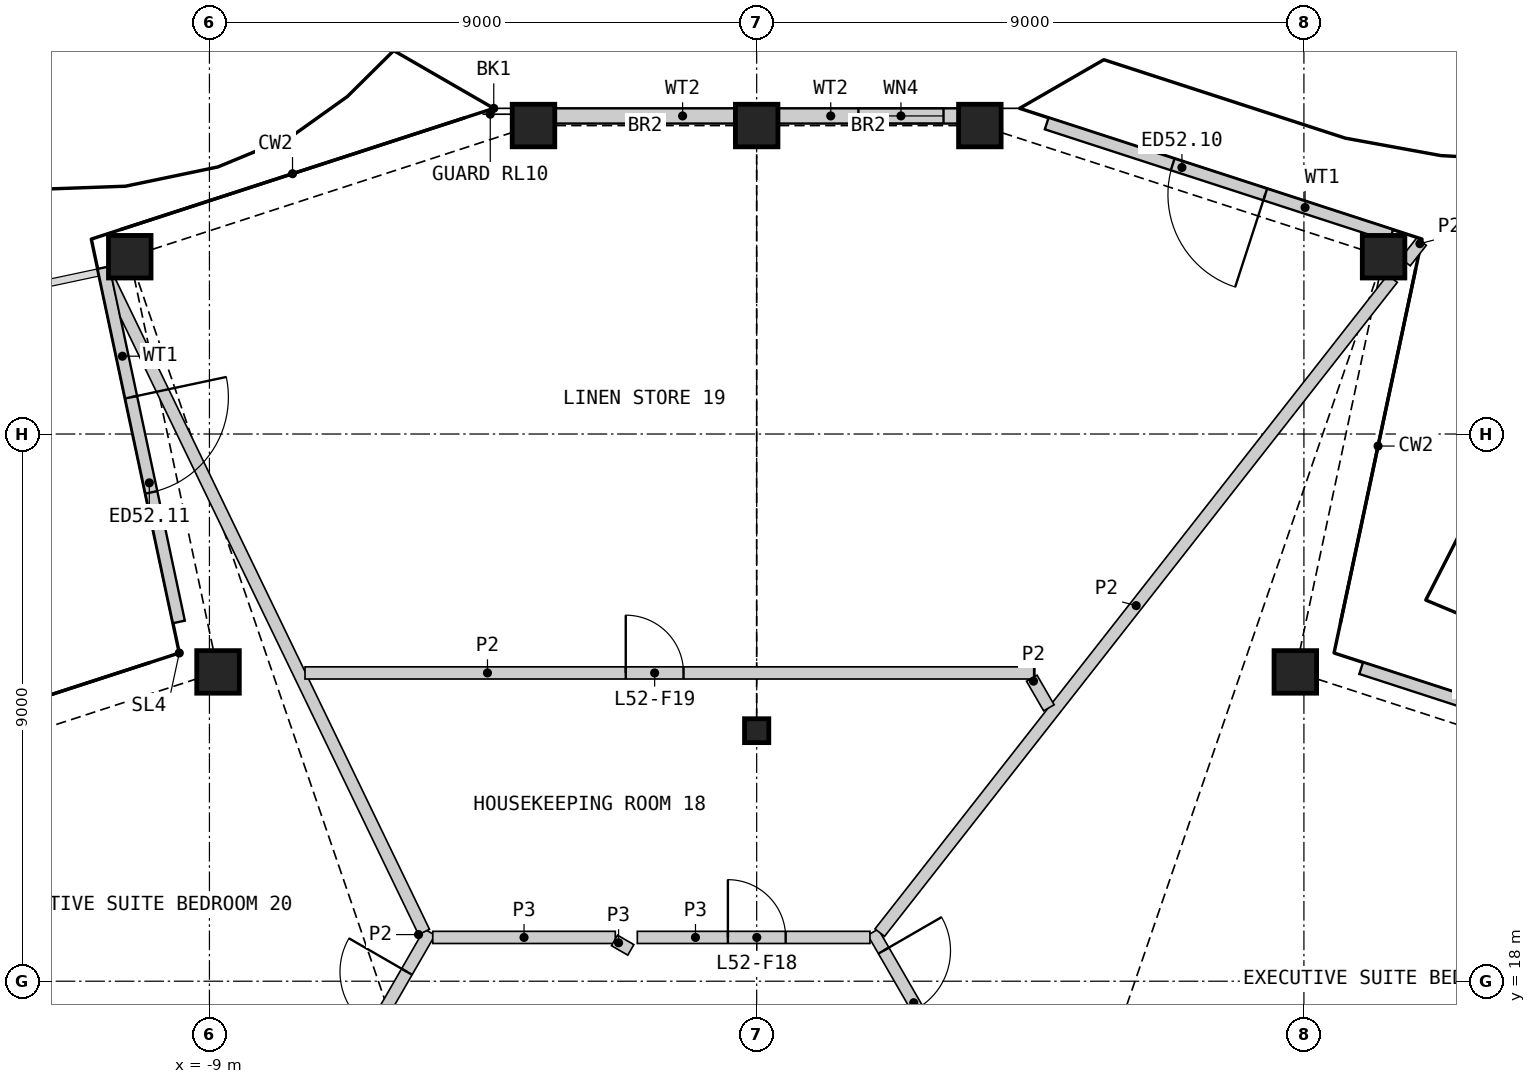
"""IFC4 building model, lengths in metres.
Left out: names, types, materials, properties, quantities, classifications, styles, units other than length and angle.
Written with IfcOpenShell. Run it as: python <this file> out.ifc"""

import sys

from ifc_helpers import new_model, si_unit, direction, frame, frame_2d, origin, origin_2d, place, context, subcontext, project, spatial, polyline, rectangle, hollow_rectangle, i_section, outline, extrude, element, fill, save


model = new_model("IFC4")
c1 = context("Model", 3, precision=1e-05, world=origin(), true_north=direction((0.0, 1.0)))
c2 = subcontext(c1, "Body", "Model", "MODEL_VIEW")
j1 = project(units=[si_unit("LENGTHUNIT", "METRE"), si_unit("PLANEANGLEUNIT", "RADIAN")], contexts=[c1])
p1 = place(None, origin())
s1 = spatial("IfcSite", under=j1, at=p1, CompositionType="ELEMENT")
p2 = place(p1, origin())
s2 = spatial("IfcBuilding", under=s1, at=p2, CompositionType="ELEMENT")
p3 = place(p2, frame((0.0, 0.0, 238.2)))
s3 = spatial("IfcBuildingStorey", under=s2, at=p3, CompositionType="ELEMENT", Elevation=238.2)
for number, where, z_axis, x_axis in (
    (1, (8.859, 23.087, 0.0), (0.0, 0.0, 1.0), (1.0, 0.0, 0.0)),
    (2, (10.31, 29.916, 0.0), (0.0, 0.0, 1.0), (1.0, 0.0, 0.0)),
    (3, (3.67, 32.073, 0.0), (0.0, 0.0, 1.0), (1.0, 0.0, 0.0)),
    (4, (0.0, 32.073, 0.0), (0.0, 0.0, 1.0), (1.0, 0.0, 0.0)),
    (5, (-3.67, 32.073, 0.0), (0.0, 0.0, 1.0), (1.0, 0.0, 0.0)),
    (6, (-10.31, 29.916, 0.0), (0.0, 0.0, 1.0), (1.0, 0.0, 0.0)),
    (7, (-8.859, 23.087, 0.0), (0.0, 0.0, 1.0), (1.0, 0.0, 0.0)),
):
    element("IfcColumn", number, at=place(p3, frame(where, z_axis=z_axis, x_axis=x_axis)), inside=s3, PredefinedType="COLUMN", context=c2, shape_type="SweptSolid", body=[
        extrude(hollow_rectangle(XDim=0.7, YDim=0.7, WallThickness=0.045, at=origin_2d()), origin(), (0.0, 0.0, 1.0), 3.6),
    ])
p4 = place(p3, frame((0.0, 22.121, 0.0), z_axis=(0.0, 0.0, 1.0), x_axis=(1.0, 0.0, 0.0)))
e8 = element("IfcColumn", 8, at=p4, inside=s3, PredefinedType="COLUMN", context=c2, shape_type="SweptSolid", body=[
    extrude(i_section(OverallWidth=0.399, OverallDepth=0.393, WebThickness=0.023, FlangeThickness=0.037, at=origin_2d()), origin(), (0.0, 0.0, 1.0), 3.6),
])
p5 = place(p3, frame((15.607, 21.308, 0.0), z_axis=(0.0, 0.0, 1.0), x_axis=(-0.951065383831, 0.308989701572, 0.0)))
e9 = element("IfcWall", 9, at=p5, inside=s3, PredefinedType="SOLIDWALL", context=c2, shape_type="SweptSolid", body=[
    extrude(rectangle(XDim=5.958, YDim=0.2, at=frame_2d((2.979, 0.0))), origin(), (0.0, 0.0, 1.0), 2.701),
])
p6 = place(p5, frame((2.179, 0.0, 0.0)))
e10 = element("IfcOpeningElement", 10, at=p6, cuts=e9, PredefinedType="OPENING", context=c2, shape_type="SweptSolid", body=[
    extrude(rectangle(XDim=1.6, YDim=2.4, at=frame_2d((0.8, 1.2))), frame((0.0, 0.11, 0.0), z_axis=(0.0, -1.0, 0.0), x_axis=(1.0, 0.0, 0.0)), (0.0, 0.0, 1.0), 0.22),
])
p7 = place(p3, frame((10.435, 30.266, 0.0), z_axis=(0.0, 0.0, 1.0), x_axis=(-0.951061471046, 0.309001744805, 0.0)))
e11 = element("IfcWall", 11, at=p7, inside=s3, PredefinedType="SOLIDWALL", context=c2, shape_type="SweptSolid", body=[
    extrude(rectangle(XDim=5.957, YDim=0.2, at=frame_2d((2.979, 0.0))), origin(), (0.0, 0.0, 1.0), 2.701),
])
p8 = place(p7, frame((2.179, 0.0, 0.0)))
e12 = element("IfcOpeningElement", 12, at=p8, cuts=e11, PredefinedType="OPENING", context=c2, shape_type="SweptSolid", body=[
    extrude(rectangle(XDim=1.6, YDim=2.4, at=frame_2d((0.8, 1.2))), frame((0.0, 0.11, 0.0), z_axis=(0.0, -1.0, 0.0), x_axis=(1.0, 0.0, 0.0)), (0.0, 0.0, 1.0), 0.22),
])
p9 = place(p3, frame((3.823, 32.231, 0.0), z_axis=(0.0, 0.0, 1.0), x_axis=(-1.0, 0.0, 0.0)))
e13 = element("IfcWall", 13, at=p9, inside=s3, PredefinedType="SOLIDWALL", context=c2, shape_type="SweptSolid", body=[
    extrude(rectangle(XDim=3.473, YDim=0.25, at=frame_2d((1.736, 0.0))), origin(), (0.0, 0.0, 1.0), 2.701),
])
p10 = place(p9, frame((0.75, 0.0, 1.8)))
e14 = element("IfcOpeningElement", 14, at=p10, cuts=e13, PredefinedType="OPENING", context=c2, shape_type="SweptSolid", body=[
    extrude(rectangle(XDim=1.4, YDim=0.7, at=frame_2d((0.7, 0.35))), frame((0.0, 0.135, 0.0), z_axis=(0.0, -1.0, 0.0), x_axis=(1.0, 0.0, 0.0)), (0.0, 0.0, 1.0), 0.27),
])
p11 = place(p3, frame((-0.35, 32.231, 0.0), z_axis=(0.0, 0.0, 1.0), x_axis=(-1.0, 0.0, 0.0)))
e15 = element("IfcWall", 15, at=p11, inside=s3, PredefinedType="SOLIDWALL", context=c2, shape_type="SweptSolid", body=[
    extrude(rectangle(XDim=3.473, YDim=0.25, at=frame_2d((1.736, 0.0))), origin(), (0.0, 0.0, 1.0), 2.701),
])
p12 = place(p3, frame((-10.741, 29.737, 0.0), z_axis=(0.0, 0.0, 1.0), x_axis=(0.207891593624, -0.978151872308, 0.0)))
e16 = element("IfcWall", 16, at=p12, inside=s3, PredefinedType="SOLIDWALL", context=c2, shape_type="SweptSolid", body=[
    extrude(rectangle(XDim=5.958, YDim=0.2, at=frame_2d((2.979, 0.0))), origin(), (0.0, 0.0, 1.0), 2.701),
])
p13 = place(p12, frame((2.179, 0.0, 0.0)))
e17 = element("IfcOpeningElement", 17, at=p13, cuts=e16, PredefinedType="OPENING", context=c2, shape_type="SweptSolid", body=[
    extrude(rectangle(XDim=1.6, YDim=2.4, at=frame_2d((0.8, 1.2))), frame((0.0, 0.11, 0.0), z_axis=(0.0, -1.0, 0.0), x_axis=(1.0, 0.0, 0.0)), (0.0, 0.0, 1.0), 0.22),
])
p14 = place(p3, frame((-18.976, -4.747, 0.0), z_axis=(0.0, 0.0, 1.0), x_axis=(0.499999852422, 0.866025488988, 0.0)))
e18 = element("IfcWall", 18, at=p14, inside=s3, PredefinedType="PARTITIONING", context=c2, shape_type="SweptSolid", body=[
    extrude(rectangle(XDim=27.198, YDim=0.2, at=frame_2d((13.599, 0.0))), origin(), (0.0, 0.0, 1.0), 3.25),
])
p15 = place(p14, frame((25.346, 0.0, 0.0)))
e19 = element("IfcOpeningElement", 19, at=p15, cuts=e18, PredefinedType="OPENING", context=c2, shape_type="SweptSolid", body=[
    extrude(rectangle(XDim=1.1, YDim=2.1, at=frame_2d((0.55, 1.05))), frame((0.0, 0.11, 0.0), z_axis=(0.0, -1.0, 0.0), x_axis=(1.0, 0.0, 0.0)), (0.0, 0.0, 1.0), 0.22),
])
p16 = place(p14, frame((16.713, 0.0, 0.0)))
e20 = element("IfcOpeningElement", 20, at=p16, cuts=e18, PredefinedType="OPENING", context=c2, shape_type="SweptSolid", body=[
    extrude(rectangle(XDim=1.1, YDim=2.1, at=frame_2d((0.55, 1.05))), frame((0.0, 0.11, 0.0), z_axis=(0.0, -1.0, 0.0), x_axis=(1.0, 0.0, 0.0)), (0.0, 0.0, 1.0), 0.22),
])
p17 = place(p14, frame((0.35, 0.0, 0.0)))
e21 = element("IfcOpeningElement", 21, at=p17, cuts=e18, PredefinedType="OPENING", context=c2, shape_type="SweptSolid", body=[
    extrude(rectangle(XDim=1.1, YDim=2.1, at=frame_2d((0.55, 1.05))), frame((0.0, 0.11, 0.0), z_axis=(0.0, -1.0, 0.0), x_axis=(1.0, 0.0, 0.0)), (0.0, 0.0, 1.0), 0.22),
])
p18 = place(p3, frame((1.913, 18.807, 0.0), z_axis=(0.0, 0.0, 1.0), x_axis=(0.499984524817, -0.866034338201, 0.0)))
e22 = element("IfcWall", 22, at=p18, inside=s3, PredefinedType="PARTITIONING", context=c2, shape_type="SweptSolid", body=[
    extrude(rectangle(XDim=5.51, YDim=0.2, at=frame_2d((2.755, 0.0))), origin(), (0.0, 0.0, 1.0), 3.25),
])
p19 = place(p18, frame((0.35, 0.0, 0.0)))
e23 = element("IfcOpeningElement", 23, at=p19, cuts=e22, PredefinedType="OPENING", context=c2, shape_type="SweptSolid", body=[
    extrude(rectangle(XDim=1.1, YDim=2.1, at=frame_2d((0.55, 1.05))), frame((0.0, 0.11, 0.0), z_axis=(0.0, -1.0, 0.0), x_axis=(1.0, 0.0, 0.0)), (0.0, 0.0, 1.0), 0.22),
])
p20 = place(p3, frame((-1.963, 18.72, 0.0), z_axis=(0.0, 0.0, 1.0), x_axis=(1.0, 0.0, 0.0)))
e24 = element("IfcWall", 24, at=p20, inside=s3, PredefinedType="PARTITIONING", context=c2, shape_type="SweptSolid", body=[
    extrude(rectangle(XDim=3.826, YDim=0.2, at=frame_2d((1.913, 0.0))), origin(), (0.0, 0.0, 1.0), 3.25),
])
p21 = place(p20, frame((1.49, 0.0, 0.0)))
e25 = element("IfcOpeningElement", 25, at=p21, cuts=e24, PredefinedType="OPENING", context=c2, shape_type="SweptSolid", body=[
    extrude(rectangle(XDim=0.95, YDim=2.1, at=frame_2d((0.475, 1.05))), frame((0.0, 0.11, 0.0), z_axis=(0.0, -1.0, 0.0), x_axis=(1.0, 0.0, 0.0)), (0.0, 0.0, 1.0), 0.22),
])
p22 = place(p3, frame((-5.327, 18.72, 0.0), z_axis=(0.0, 0.0, 1.0), x_axis=(1.0, 0.0, 0.0)))
e26 = element("IfcWall", 26, at=p22, inside=s3, PredefinedType="PARTITIONING", context=c2, shape_type="SweptSolid", body=[
    extrude(rectangle(XDim=3.002, YDim=0.2, at=frame_2d((1.501, 0.0))), origin(), (0.0, 0.0, 1.0), 3.25),
])
p23 = place(p3, frame((-2.338, 18.67, 0.0), z_axis=(0.0, 0.0, 1.0), x_axis=(0.866054481515, -0.499949632511, 0.0)))
e27 = element("IfcWall", 27, at=p23, inside=s3, PredefinedType="PARTITIONING", context=c2, shape_type="SweptSolid", body=[
    extrude(rectangle(XDim=0.31, YDim=0.2, at=frame_2d((0.155, 0.0))), origin(), (0.0, 0.0, 1.0), 3.25),
])
p24 = place(p3, frame((2.025, 18.799, 0.0), z_axis=(0.0, 0.0, 1.0), x_axis=(0.616942368609, 0.787008331478, 0.0)))
e28 = element("IfcWall", 28, at=p24, inside=s3, PredefinedType="PARTITIONING", context=c2, shape_type="SweptSolid", body=[
    extrude(rectangle(XDim=13.668, YDim=0.2, at=frame_2d((6.834, 0.0))), origin(), (0.0, 0.0, 1.0), 2.404),
])
p25 = place(p3, origin())
e29 = element("IfcWall", 29, at=p25, inside=s3, PredefinedType="PARTITIONING", context=c2, shape_type="SweptSolid", body=[
    extrude(outline(polyline([(-5.561, 18.767), (-10.466, 28.923), (-10.64, 29.745), (-5.381, 18.854), (-5.561, 18.767)])), origin(), (0.0, 0.0, 1.0), 2.404),
])
p26 = place(p3, frame((-7.428, 23.071, 0.0), z_axis=(0.0, 0.0, 1.0), x_axis=(1.0, 0.0, 0.0)))
e30 = element("IfcWall", 30, at=p26, inside=s3, PredefinedType="PARTITIONING", context=c2, shape_type="SweptSolid", body=[
    extrude(rectangle(XDim=12.002, YDim=0.2, at=frame_2d((6.001, 0.0))), origin(), (0.0, 0.0, 1.0), 2.404),
])
p27 = place(p26, frame((5.275, 0.0, 0.0)))
e31 = element("IfcOpeningElement", 31, at=p27, cuts=e30, PredefinedType="OPENING", context=c2, shape_type="SweptSolid", body=[
    extrude(rectangle(XDim=0.95, YDim=2.1, at=frame_2d((0.475, 1.05))), frame((0.0, 0.11, 0.0), z_axis=(0.0, -1.0, 0.0), x_axis=(1.0, 0.0, 0.0)), (0.0, 0.0, 1.0), 0.22),
])
p28 = place(p3, frame((4.524, 22.984, 0.0), z_axis=(0.0, 0.0, 1.0), x_axis=(0.500248658738, -0.865881792989, 0.0)))
e32 = element("IfcWall", 32, at=p28, inside=s3, PredefinedType="PARTITIONING", context=c2, shape_type="SweptSolid", body=[
    extrude(rectangle(XDim=0.562, YDim=0.2, at=frame_2d((0.281, 0.0))), origin(), (0.0, 0.0, 1.0), 2.404),
])
p29 = place(p3, frame((10.67, 29.828, 0.0), z_axis=(0.0, 0.0, 1.0), x_axis=(0.617216179113, 0.786793612227, 0.0)))
e33 = element("IfcWall", 33, at=p29, inside=s3, PredefinedType="PARTITIONING", context=c2, shape_type="SweptSolid", body=[
    extrude(rectangle(XDim=0.427, YDim=0.2, at=frame_2d((0.214, 0.0))), origin(), (0.0, 0.0, 1.0), 2.404),
])
p30 = place(p8, origin())
e34 = element("IfcDoor", 34, at=p30, inside=s3, OperationType="DOUBLE_DOOR_SINGLE_SWING", PredefinedType="DOOR", context=c2, shape_type="SweptSolid", body=[
    extrude(rectangle(XDim=1.6, YDim=2.4, at=frame_2d((0.8, 1.2))), frame((0.0, 0.025, 0.0), z_axis=(0.0, -1.0, 0.0), x_axis=(1.0, 0.0, 0.0)), (0.0, 0.0, 1.0), 0.05),
])
fill(e12, e34)
p31 = place(p10, origin())
e35 = element("IfcWindow", 35, at=p31, inside=s3, PartitioningType="SINGLE_PANEL", PredefinedType="WINDOW", context=c2, shape_type="SweptSolid", body=[
    extrude(rectangle(XDim=1.4, YDim=0.7, at=frame_2d((0.7, 0.35))), frame((0.0, 0.03, 0.0), z_axis=(0.0, -1.0, 0.0), x_axis=(1.0, 0.0, 0.0)), (0.0, 0.0, 1.0), 0.06),
])
fill(e14, e35)
p32 = place(p13, origin())
e36 = element("IfcDoor", 36, at=p32, inside=s3, OperationType="DOUBLE_DOOR_SINGLE_SWING", PredefinedType="DOOR", context=c2, shape_type="SweptSolid", body=[
    extrude(rectangle(XDim=1.6, YDim=2.4, at=frame_2d((0.8, 1.2))), frame((0.0, 0.025, 0.0), z_axis=(0.0, -1.0, 0.0), x_axis=(1.0, 0.0, 0.0)), (0.0, 0.0, 1.0), 0.05),
])
fill(e17, e36)
p33 = place(p19, origin())
e37 = element("IfcDoor", 37, at=p33, inside=s3, OperationType="SINGLE_SWING_LEFT", PredefinedType="DOOR", context=c2, shape_type="SweptSolid", body=[
    extrude(rectangle(XDim=1.1, YDim=2.1, at=frame_2d((0.55, 1.05))), frame((0.0, 0.025, 0.0), z_axis=(0.0, -1.0, 0.0), x_axis=(1.0, 0.0, 0.0)), (0.0, 0.0, 1.0), 0.05),
])
fill(e23, e37)
p34 = place(p21, origin())
e38 = element("IfcDoor", 38, at=p34, inside=s3, OperationType="SINGLE_SWING_LEFT", PredefinedType="DOOR", context=c2, shape_type="SweptSolid", body=[
    extrude(rectangle(XDim=0.95, YDim=2.1, at=frame_2d((0.475, 1.05))), frame((0.0, 0.025, 0.0), z_axis=(0.0, -1.0, 0.0), x_axis=(1.0, 0.0, 0.0)), (0.0, 0.0, 1.0), 0.05),
])
fill(e25, e38)
p35 = place(p27, origin())
e39 = element("IfcDoor", 39, at=p35, inside=s3, OperationType="SINGLE_SWING_LEFT", PredefinedType="DOOR", context=c2, shape_type="SweptSolid", body=[
    extrude(rectangle(XDim=0.95, YDim=2.1, at=frame_2d((0.475, 1.05))), frame((0.0, 0.025, 0.0), z_axis=(0.0, -1.0, 0.0), x_axis=(1.0, 0.0, 0.0)), (0.0, 0.0, 1.0), 0.05),
])
fill(e31, e39)
p36 = place(p15, origin())
e40 = element("IfcDoor", 40, at=p36, inside=s3, OperationType="SINGLE_SWING_RIGHT", PredefinedType="DOOR", context=c2, shape_type="SweptSolid", body=[
    extrude(rectangle(XDim=1.1, YDim=2.1, at=frame_2d((0.55, 1.05))), frame((0.0, 0.025, 0.0), z_axis=(0.0, -1.0, 0.0), x_axis=(1.0, 0.0, 0.0)), (0.0, 0.0, 1.0), 0.05),
])
fill(e19, e40)
save(model, sys.argv[1])
